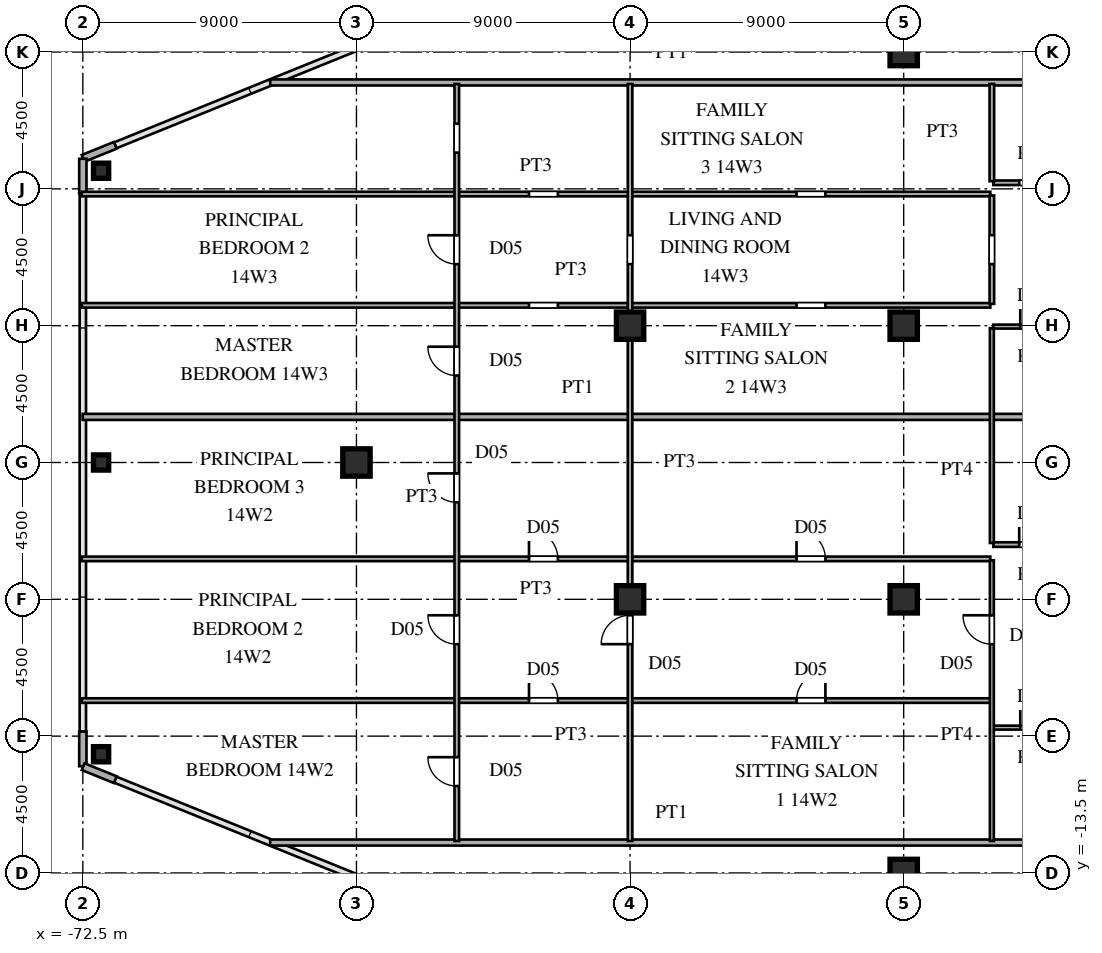
"""IFC4 building model, lengths in metres.
Left out: names, types, materials, properties, quantities, classifications, styles, units other than length and angle.
Written with IfcOpenShell. Run it as: python <this file> out.ifc"""

import sys

from ifc_helpers import new_model, si_unit, direction, frame, frame_2d, origin, origin_2d, place, context, subcontext, project, spatial, rectangle, hollow_rectangle, i_section, extrude, source, transform, mapped, element, fill, save


model = new_model("IFC4")
c1 = context("Model", 3, precision=1e-05, world=origin(), true_north=direction((0.0, 1.0)))
c2 = subcontext(c1, "Body", "Model", "MODEL_VIEW")
j1 = project(units=[si_unit("LENGTHUNIT", "METRE"), si_unit("PLANEANGLEUNIT", "RADIAN")], contexts=[c1])
p1 = place(None, origin())
s1 = spatial("IfcSite", under=j1, at=p1, CompositionType="ELEMENT")
p2 = place(p1, origin())
s2 = spatial("IfcBuilding", under=s1, at=p2, CompositionType="ELEMENT")
p3 = place(p2, frame((0.0, 0.0, 54.9)))
s3 = spatial("IfcBuildingStorey", under=s2, at=p3, CompositionType="ELEMENT", Elevation=54.9)
m1 = source(origin(), c2, "Body", "SweptSolid", [
    extrude(i_section(OverallWidth=0.9, OverallDepth=0.9, WebThickness=0.036, FlangeThickness=0.055, at=origin_2d()), origin(), (0.0, 0.0, 1.0), 3.6),
])
for number, where, z_axis, x_axis in (
    (1, (-45.5, -13.5, 0.0), (0.0, 0.0, 1.0), (1.0, 0.0, 0.0)),
    (2, (-45.5, -4.5, 0.0), (0.0, 0.0, 1.0), (1.0, 0.0, 0.0)),
    (3, (-45.5, 4.5, 0.0), (0.0, 0.0, 1.0), (1.0, 0.0, 0.0)),
    (4, (-45.5, 13.5, 0.0), (0.0, 0.0, 1.0), (1.0, 0.0, 0.0)),
    (5, (-54.5, -4.5, 0.0), (0.0, 0.0, 1.0), (1.0, 0.0, 0.0)),
    (6, (-54.5, 4.5, 0.0), (0.0, 0.0, 1.0), (1.0, 0.0, 0.0)),
    (7, (-63.5, 0.0, 0.0), (0.0, 0.0, 1.0), (1.0, 0.0, 0.0)),
):
    element("IfcColumn", number, at=place(p3, frame(where, z_axis=z_axis, x_axis=x_axis)), inside=s3, PredefinedType="COLUMN", context=c2, shape_type="MappedRepresentation", body=[
        mapped(m1, transform((0.0, 0.0, 0.0), scale=1.0)),
    ])
m2 = source(origin(), c2, "Body", "SweptSolid", [
    extrude(hollow_rectangle(XDim=0.5, YDim=0.5, WallThickness=0.02, at=origin_2d()), origin(), (0.0, 0.0, 1.0), 3.6),
])
for number, where, z_axis, x_axis in (
    (8, (-71.9, 9.596, 0.0), (0.0, 0.0, 1.0), (1.0, 0.0, 0.0)),
    (9, (-71.9, -9.596, 0.0), (0.0, 0.0, 1.0), (1.0, 0.0, 0.0)),
    (10, (-71.9, 0.0, 0.0), (0.0, 0.0, 1.0), (1.0, 0.0, 0.0)),
):
    element("IfcColumn", number, at=place(p3, frame(where, z_axis=z_axis, x_axis=x_axis)), inside=s3, PredefinedType="COLUMN", context=c2, shape_type="MappedRepresentation", body=[
        mapped(m2, transform((0.0, 0.0, 0.0), scale=1.0)),
    ])
for number, where, z_axis, x_axis in (
    (11, (-71.434, 10.431, 0.0), (0.0, 0.0, 1.0), (-0.927, -0.375, 0.0)),
    (12, (-72.5, 9.99, 0.0), (0.0, 0.0, 1.0), (0.0, -1.0, 0.0)),
    (13, (-72.5, -8.85, 0.0), (0.0, 0.0, 1.0), (0.0, -1.0, 0.0)),
    (14, (-72.491, -10.004, 0.0), (0.0, 0.0, 1.0), (0.927, -0.375, 0.0)),
):
    element("IfcWall", number, at=place(p3, frame(where, z_axis=z_axis, x_axis=x_axis)), inside=s3, PredefinedType="SOLIDWALL", context=c2, shape_type="SweptSolid", body=[
        extrude(rectangle(XDim=1.14, YDim=0.24, at=frame_2d((0.57, 0.0))), origin(), (0.0, 0.0, 1.0), 3.38),
    ])
p4 = place(p3, frame((-66.337, -12.5, 0.0), z_axis=(0.0, 0.0, 1.0), x_axis=(1.0, 0.0, 0.0)))
e15 = element("IfcWall", 15, at=p4, inside=s3, PredefinedType="PARTITIONING", context=c2, shape_type="SweptSolid", body=[
    extrude(rectangle(XDim=26.407, YDim=0.2, at=frame_2d((13.204, 0.0))), origin(), (0.0, 0.0, 1.0), 3.38),
])
p5 = place(p3, frame((-42.55, -8.72, 0.0), z_axis=(0.0, 0.0, 1.0), x_axis=(1.0, 0.0, 0.0)))
e16 = element("IfcWall", 16, at=p5, inside=s3, PredefinedType="PARTITIONING", context=c2, shape_type="SweptSolid", body=[
    extrude(rectangle(XDim=2.65, YDim=0.13, at=frame_2d((1.325, 0.0))), origin(), (0.0, 0.0, 1.0), 3.38),
])
p6 = place(p5, frame((0.885, 0.0, 0.0)))
e17 = element("IfcOpeningElement", 17, at=p6, cuts=e16, PredefinedType="OPENING", context=c2, shape_type="SweptSolid", body=[
    extrude(rectangle(XDim=0.88, YDim=2.1, at=frame_2d((0.44, 1.05))), frame((0.0, 0.075, 0.0), z_axis=(0.0, -1.0, 0.0), x_axis=(1.0, 0.0, 0.0)), (0.0, 0.0, 1.0), 0.15),
])
p7 = place(p3, frame((-72.535, -7.83, 0.0), z_axis=(0.0, 0.0, 1.0), x_axis=(1.0, 0.0, 0.0)))
e18 = element("IfcWall", 18, at=p7, inside=s3, PredefinedType="PARTITIONING", context=c2, shape_type="SweptSolid", body=[
    extrude(rectangle(XDim=29.885, YDim=0.15, at=frame_2d((14.942, 0.0))), origin(), (0.0, 0.0, 1.0), 3.38),
])
p8 = place(p7, frame((23.51, 0.0, 0.0)))
e19 = element("IfcOpeningElement", 19, at=p8, cuts=e18, PredefinedType="OPENING", context=c2, shape_type="SweptSolid", body=[
    extrude(rectangle(XDim=0.95, YDim=2.15, at=frame_2d((0.475, 1.075))), frame((0.0, 0.085, 0.0), z_axis=(0.0, -1.0, 0.0), x_axis=(1.0, 0.0, 0.0)), (0.0, 0.0, 1.0), 0.17),
])
p9 = place(p7, frame((14.71, 0.0, 0.0)))
e20 = element("IfcOpeningElement", 20, at=p9, cuts=e18, PredefinedType="OPENING", context=c2, shape_type="SweptSolid", body=[
    extrude(rectangle(XDim=0.95, YDim=2.15, at=frame_2d((0.475, 1.075))), frame((0.0, 0.085, 0.0), z_axis=(0.0, -1.0, 0.0), x_axis=(1.0, 0.0, 0.0)), (0.0, 0.0, 1.0), 0.17),
])
p10 = place(p3, frame((-72.535, -3.17, 0.0), z_axis=(0.0, 0.0, 1.0), x_axis=(1.0, 0.0, 0.0)))
e21 = element("IfcWall", 21, at=p10, inside=s3, PredefinedType="PARTITIONING", context=c2, shape_type="SweptSolid", body=[
    extrude(rectangle(XDim=29.885, YDim=0.15, at=frame_2d((14.942, 0.0))), origin(), (0.0, 0.0, 1.0), 3.38),
])
p11 = place(p10, frame((23.51, 0.0, 0.0)))
e22 = element("IfcOpeningElement", 22, at=p11, cuts=e21, PredefinedType="OPENING", context=c2, shape_type="SweptSolid", body=[
    extrude(rectangle(XDim=0.95, YDim=2.15, at=frame_2d((0.475, 1.075))), frame((0.0, 0.085, 0.0), z_axis=(0.0, -1.0, 0.0), x_axis=(1.0, 0.0, 0.0)), (0.0, 0.0, 1.0), 0.17),
])
p12 = place(p10, frame((14.71, 0.0, 0.0)))
e23 = element("IfcOpeningElement", 23, at=p12, cuts=e21, PredefinedType="OPENING", context=c2, shape_type="SweptSolid", body=[
    extrude(rectangle(XDim=0.95, YDim=2.15, at=frame_2d((0.475, 1.075))), frame((0.0, 0.085, 0.0), z_axis=(0.0, -1.0, 0.0), x_axis=(1.0, 0.0, 0.0)), (0.0, 0.0, 1.0), 0.17),
])
p13 = place(p3, frame((-42.55, -2.7, 0.0), z_axis=(0.0, 0.0, 1.0), x_axis=(1.0, 0.0, 0.0)))
e24 = element("IfcWall", 24, at=p13, inside=s3, PredefinedType="PARTITIONING", context=c2, shape_type="SweptSolid", body=[
    extrude(rectangle(XDim=2.65, YDim=0.15, at=frame_2d((1.325, 0.0))), origin(), (0.0, 0.0, 1.0), 3.38),
])
p14 = place(p13, frame((0.85, 0.0, 0.0)))
e25 = element("IfcOpeningElement", 25, at=p14, cuts=e24, PredefinedType="OPENING", context=c2, shape_type="SweptSolid", body=[
    extrude(rectangle(XDim=0.95, YDim=2.15, at=frame_2d((0.475, 1.075))), frame((0.0, 0.085, 0.0), z_axis=(0.0, -1.0, 0.0), x_axis=(1.0, 0.0, 0.0)), (0.0, 0.0, 1.0), 0.17),
])
p15 = place(p3, frame((-72.505, 1.5, 0.0), z_axis=(0.0, 0.0, 1.0), x_axis=(1.0, 0.0, 0.0)))
e26 = element("IfcWall", 26, at=p15, inside=s3, PredefinedType="PARTITIONING", context=c2, shape_type="SweptSolid", body=[
    extrude(rectangle(XDim=32.575, YDim=0.2, at=frame_2d((16.288, 0.0))), origin(), (0.0, 0.0, 1.0), 3.38),
])
p16 = place(p3, frame((-42.55, 4.47, 0.0), z_axis=(0.0, 0.0, 1.0), x_axis=(1.0, 0.0, 0.0)))
e27 = element("IfcWall", 27, at=p16, inside=s3, PredefinedType="PARTITIONING", context=c2, shape_type="SweptSolid", body=[
    extrude(rectangle(XDim=2.65, YDim=0.13, at=frame_2d((1.325, 0.0))), origin(), (0.0, 0.0, 1.0), 2.68),
])
p17 = place(p16, frame((0.885, 0.0, 0.0)))
e28 = element("IfcOpeningElement", 28, at=p17, cuts=e27, PredefinedType="OPENING", context=c2, shape_type="SweptSolid", body=[
    extrude(rectangle(XDim=0.88, YDim=2.1, at=frame_2d((0.44, 1.05))), frame((0.0, 0.075, 0.0), z_axis=(0.0, -1.0, 0.0), x_axis=(1.0, 0.0, 0.0)), (0.0, 0.0, 1.0), 0.15),
])
p18 = place(p3, frame((-72.535, 5.17, 0.0), z_axis=(0.0, 0.0, 1.0), x_axis=(1.0, 0.0, 0.0)))
e29 = element("IfcWall", 29, at=p18, inside=s3, PredefinedType="PARTITIONING", context=c2, shape_type="SweptSolid", body=[
    extrude(rectangle(XDim=29.885, YDim=0.15, at=frame_2d((14.942, 0.0))), origin(), (0.0, 0.0, 1.0), 3.38),
])
p19 = place(p18, frame((23.51, 0.0, 0.0)))
e30 = element("IfcOpeningElement", 30, at=p19, cuts=e29, PredefinedType="OPENING", context=c2, shape_type="SweptSolid", body=[
    extrude(rectangle(XDim=0.95, YDim=2.15, at=frame_2d((0.475, 1.075))), frame((0.0, 0.085, 0.0), z_axis=(0.0, -1.0, 0.0), x_axis=(1.0, 0.0, 0.0)), (0.0, 0.0, 1.0), 0.17),
])
p20 = place(p18, frame((14.71, 0.0, 0.0)))
e31 = element("IfcOpeningElement", 31, at=p20, cuts=e29, PredefinedType="OPENING", context=c2, shape_type="SweptSolid", body=[
    extrude(rectangle(XDim=0.95, YDim=2.15, at=frame_2d((0.475, 1.075))), frame((0.0, 0.085, 0.0), z_axis=(0.0, -1.0, 0.0), x_axis=(1.0, 0.0, 0.0)), (0.0, 0.0, 1.0), 0.17),
])
p21 = place(p3, frame((-72.535, 8.83, 0.0), z_axis=(0.0, 0.0, 1.0), x_axis=(1.0, 0.0, 0.0)))
e32 = element("IfcWall", 32, at=p21, inside=s3, PredefinedType="PARTITIONING", context=c2, shape_type="SweptSolid", body=[
    extrude(rectangle(XDim=29.885, YDim=0.15, at=frame_2d((14.942, 0.0))), origin(), (0.0, 0.0, 1.0), 3.38),
])
p22 = place(p21, frame((23.51, 0.0, 0.0)))
e33 = element("IfcOpeningElement", 33, at=p22, cuts=e32, PredefinedType="OPENING", context=c2, shape_type="SweptSolid", body=[
    extrude(rectangle(XDim=0.95, YDim=2.15, at=frame_2d((0.475, 1.075))), frame((0.0, 0.085, 0.0), z_axis=(0.0, -1.0, 0.0), x_axis=(1.0, 0.0, 0.0)), (0.0, 0.0, 1.0), 0.17),
])
p23 = place(p21, frame((14.71, 0.0, 0.0)))
e34 = element("IfcOpeningElement", 34, at=p23, cuts=e32, PredefinedType="OPENING", context=c2, shape_type="SweptSolid", body=[
    extrude(rectangle(XDim=0.95, YDim=2.15, at=frame_2d((0.475, 1.075))), frame((0.0, 0.085, 0.0), z_axis=(0.0, -1.0, 0.0), x_axis=(1.0, 0.0, 0.0)), (0.0, 0.0, 1.0), 0.17),
])
p24 = place(p3, frame((-42.55, 9.2, 0.0), z_axis=(0.0, 0.0, 1.0), x_axis=(1.0, 0.0, 0.0)))
e35 = element("IfcWall", 35, at=p24, inside=s3, PredefinedType="PARTITIONING", context=c2, shape_type="SweptSolid", body=[
    extrude(rectangle(XDim=2.65, YDim=0.15, at=frame_2d((1.325, 0.0))), origin(), (0.0, 0.0, 1.0), 3.38),
])
p25 = place(p24, frame((0.85, 0.0, 0.0)))
e36 = element("IfcOpeningElement", 36, at=p25, cuts=e35, PredefinedType="OPENING", context=c2, shape_type="SweptSolid", body=[
    extrude(rectangle(XDim=0.95, YDim=2.15, at=frame_2d((0.475, 1.075))), frame((0.0, 0.085, 0.0), z_axis=(0.0, -1.0, 0.0), x_axis=(1.0, 0.0, 0.0)), (0.0, 0.0, 1.0), 0.17),
])
p26 = place(p3, frame((-66.337, 12.5, 0.0), z_axis=(0.0, 0.0, 1.0), x_axis=(1.0, 0.0, 0.0)))
e37 = element("IfcWall", 37, at=p26, inside=s3, PredefinedType="PARTITIONING", context=c2, shape_type="SweptSolid", body=[
    extrude(rectangle(XDim=26.407, YDim=0.2, at=frame_2d((13.204, 0.0))), origin(), (0.0, 0.0, 1.0), 3.38),
])
p27 = place(p3, frame((-60.2, -12.45, 0.0), z_axis=(0.0, 0.0, 1.0), x_axis=(0.0, 1.0, 0.0)))
e38 = element("IfcWall", 38, at=p27, inside=s3, PredefinedType="PARTITIONING", context=c2, shape_type="SweptSolid", body=[
    extrude(rectangle(XDim=24.9, YDim=0.15, at=frame_2d((12.45, 0.0))), origin(), (0.0, 0.0, 1.0), 3.38),
])
p28 = place(p27, frame((1.808, 0.0, 0.0)))
e39 = element("IfcOpeningElement", 39, at=p28, cuts=e38, PredefinedType="OPENING", context=c2, shape_type="SweptSolid", body=[
    extrude(rectangle(XDim=0.95, YDim=2.15, at=frame_2d((0.475, 1.075))), frame((0.0, 0.085, 0.0), z_axis=(0.0, -1.0, 0.0), x_axis=(1.0, 0.0, 0.0)), (0.0, 0.0, 1.0), 0.17),
])
p29 = place(p27, frame((6.475, 0.0, 0.0)))
e40 = element("IfcOpeningElement", 40, at=p29, cuts=e38, PredefinedType="OPENING", context=c2, shape_type="SweptSolid", body=[
    extrude(rectangle(XDim=0.95, YDim=2.15, at=frame_2d((0.475, 1.075))), frame((0.0, 0.085, 0.0), z_axis=(0.0, -1.0, 0.0), x_axis=(1.0, 0.0, 0.0)), (0.0, 0.0, 1.0), 0.17),
])
p30 = place(p27, frame((11.142, 0.0, 0.0)))
e41 = element("IfcOpeningElement", 41, at=p30, cuts=e38, PredefinedType="OPENING", context=c2, shape_type="SweptSolid", body=[
    extrude(rectangle(XDim=0.95, YDim=2.15, at=frame_2d((0.475, 1.075))), frame((0.0, 0.085, 0.0), z_axis=(0.0, -1.0, 0.0), x_axis=(1.0, 0.0, 0.0)), (0.0, 0.0, 1.0), 0.17),
])
p31 = place(p27, frame((15.308, 0.0, 0.0)))
e42 = element("IfcOpeningElement", 42, at=p31, cuts=e38, PredefinedType="OPENING", context=c2, shape_type="SweptSolid", body=[
    extrude(rectangle(XDim=0.95, YDim=2.15, at=frame_2d((0.475, 1.075))), frame((0.0, 0.085, 0.0), z_axis=(0.0, -1.0, 0.0), x_axis=(1.0, 0.0, 0.0)), (0.0, 0.0, 1.0), 0.17),
])
p32 = place(p27, frame((18.975, 0.0, 0.0)))
e43 = element("IfcOpeningElement", 43, at=p32, cuts=e38, PredefinedType="OPENING", context=c2, shape_type="SweptSolid", body=[
    extrude(rectangle(XDim=0.95, YDim=2.15, at=frame_2d((0.475, 1.075))), frame((0.0, 0.085, 0.0), z_axis=(0.0, -1.0, 0.0), x_axis=(1.0, 0.0, 0.0)), (0.0, 0.0, 1.0), 0.17),
])
p33 = place(p27, frame((22.642, 0.0, 0.0)))
e44 = element("IfcOpeningElement", 44, at=p33, cuts=e38, PredefinedType="OPENING", context=c2, shape_type="SweptSolid", body=[
    extrude(rectangle(XDim=0.95, YDim=2.15, at=frame_2d((0.475, 1.075))), frame((0.0, 0.085, 0.0), z_axis=(0.0, -1.0, 0.0), x_axis=(1.0, 0.0, 0.0)), (0.0, 0.0, 1.0), 0.17),
])
p34 = place(p3, frame((-54.5, -12.45, 0.0), z_axis=(0.0, 0.0, 1.0), x_axis=(0.0, 1.0, 0.0)))
e45 = element("IfcWall", 45, at=p34, inside=s3, PredefinedType="PARTITIONING", context=c2, shape_type="SweptSolid", body=[
    extrude(rectangle(XDim=24.9, YDim=0.15, at=frame_2d((12.45, 0.0))), origin(), (0.0, 0.0, 1.0), 2.68),
])
p35 = place(p34, frame((6.475, 0.0, 0.0)))
e46 = element("IfcOpeningElement", 46, at=p35, cuts=e45, PredefinedType="OPENING", context=c2, shape_type="SweptSolid", body=[
    extrude(rectangle(XDim=0.95, YDim=2.15, at=frame_2d((0.475, 1.075))), frame((0.0, 0.085, 0.0), z_axis=(0.0, -1.0, 0.0), x_axis=(1.0, 0.0, 0.0)), (0.0, 0.0, 1.0), 0.17),
])
p36 = place(p34, frame((18.975, 0.0, 0.0)))
e47 = element("IfcOpeningElement", 47, at=p36, cuts=e45, PredefinedType="OPENING", context=c2, shape_type="SweptSolid", body=[
    extrude(rectangle(XDim=0.95, YDim=2.15, at=frame_2d((0.475, 1.075))), frame((0.0, 0.085, 0.0), z_axis=(0.0, -1.0, 0.0), x_axis=(1.0, 0.0, 0.0)), (0.0, 0.0, 1.0), 0.17),
])
p37 = place(p3, frame((-42.6, -12.45, 0.0), z_axis=(0.0, 0.0, 1.0), x_axis=(0.0, 1.0, 0.0)))
e48 = element("IfcWall", 48, at=p37, inside=s3, PredefinedType="PARTITIONING", context=c2, shape_type="SweptSolid", body=[
    extrude(rectangle(XDim=9.233, YDim=0.13, at=frame_2d((4.616, 0.0))), origin(), (0.0, 0.0, 1.0), 3.38),
])
p38 = place(p37, frame((6.475, 0.0, 0.0)))
e49 = element("IfcOpeningElement", 49, at=p38, cuts=e48, PredefinedType="OPENING", context=c2, shape_type="SweptSolid", body=[
    extrude(rectangle(XDim=0.95, YDim=2.15, at=frame_2d((0.475, 1.075))), frame((0.0, 0.075, 0.0), z_axis=(0.0, -1.0, 0.0), x_axis=(1.0, 0.0, 0.0)), (0.0, 0.0, 1.0), 0.15),
])
p39 = place(p3, frame((-42.6, -2.648, 0.0), z_axis=(0.0, 0.0, 1.0), x_axis=(0.0, 1.0, 0.0)))
e50 = element("IfcWall", 50, at=p39, inside=s3, PredefinedType="PARTITIONING", context=c2, shape_type="SweptSolid", body=[
    extrude(rectangle(XDim=7.066, YDim=0.13, at=frame_2d((3.533, 0.0))), origin(), (0.0, 0.0, 1.0), 3.38),
])
p40 = place(p3, frame((-42.6, 5.217, 0.0), z_axis=(0.0, 0.0, 1.0), x_axis=(0.0, 1.0, 0.0)))
e51 = element("IfcWall", 51, at=p40, inside=s3, PredefinedType="PARTITIONING", context=c2, shape_type="SweptSolid", body=[
    extrude(rectangle(XDim=3.566, YDim=0.15, at=frame_2d((1.783, 0.0))), origin(), (0.0, 0.0, 1.0), 3.38),
])
p41 = place(p40, frame((1.308, 0.0, 0.0)))
e52 = element("IfcOpeningElement", 52, at=p41, cuts=e51, PredefinedType="OPENING", context=c2, shape_type="SweptSolid", body=[
    extrude(rectangle(XDim=0.95, YDim=2.15, at=frame_2d((0.475, 1.075))), frame((0.0, 0.085, 0.0), z_axis=(0.0, -1.0, 0.0), x_axis=(1.0, 0.0, 0.0)), (0.0, 0.0, 1.0), 0.17),
])
p42 = place(p3, frame((-42.6, 9.252, 0.0), z_axis=(0.0, 0.0, 1.0), x_axis=(0.0, 1.0, 0.0)))
e53 = element("IfcWall", 53, at=p42, inside=s3, PredefinedType="PARTITIONING", context=c2, shape_type="SweptSolid", body=[
    extrude(rectangle(XDim=3.198, YDim=0.15, at=frame_2d((1.599, 0.0))), origin(), (0.0, 0.0, 1.0), 3.38),
])
m3 = source(origin(), c2, "Body", "SweptSolid", [
    extrude(rectangle(XDim=0.88, YDim=2.1, at=frame_2d((0.44, 1.05))), frame((0.0, 0.025, 0.0), z_axis=(0.0, -1.0, 0.0), x_axis=(1.0, 0.0, 0.0)), (0.0, 0.0, 1.0), 0.05),
])
p43 = place(p6, origin())
e54 = element("IfcDoor", 54, at=p43, inside=s3, OperationType="SINGLE_SWING_LEFT", PredefinedType="DOOR", context=c2, shape_type="MappedRepresentation", body=[
    mapped(m3, transform((0.0, 0.0, 0.0), scale=1.0)),
])
fill(e17, e54)
m4 = source(origin(), c2, "Body", "SweptSolid", [
    extrude(rectangle(XDim=0.95, YDim=2.15, at=frame_2d((0.475, 1.075))), frame((0.0, 0.025, 0.0), z_axis=(0.0, -1.0, 0.0), x_axis=(1.0, 0.0, 0.0)), (0.0, 0.0, 1.0), 0.05),
])
p44 = place(p8, origin())
e55 = element("IfcDoor", 55, at=p44, inside=s3, OperationType="SINGLE_SWING_RIGHT", PredefinedType="DOOR", context=c2, shape_type="MappedRepresentation", body=[
    mapped(m4, transform((0.0, 0.0, 0.0), scale=1.0)),
])
fill(e19, e55)
p45 = place(p9, origin())
e56 = element("IfcDoor", 56, at=p45, inside=s3, OperationType="SINGLE_SWING_LEFT", PredefinedType="DOOR", context=c2, shape_type="MappedRepresentation", body=[
    mapped(m4, transform((0.0, 0.0, 0.0), scale=1.0)),
])
fill(e20, e56)
p46 = place(p11, origin())
e57 = element("IfcDoor", 57, at=p46, inside=s3, OperationType="SINGLE_SWING_LEFT", PredefinedType="DOOR", context=c2, shape_type="MappedRepresentation", body=[
    mapped(m4, transform((0.0, 0.0, 0.0), scale=1.0)),
])
fill(e22, e57)
p47 = place(p12, origin())
e58 = element("IfcDoor", 58, at=p47, inside=s3, OperationType="SINGLE_SWING_LEFT", PredefinedType="DOOR", context=c2, shape_type="MappedRepresentation", body=[
    mapped(m4, transform((0.0, 0.0, 0.0), scale=1.0)),
])
fill(e23, e58)
p48 = place(p14, origin())
e59 = element("IfcDoor", 59, at=p48, inside=s3, OperationType="SINGLE_SWING_LEFT", PredefinedType="DOOR", context=c2, shape_type="MappedRepresentation", body=[
    mapped(m4, transform((0.0, 0.0, 0.0), scale=1.0)),
])
fill(e25, e59)
p49 = place(p17, origin())
e60 = element("IfcDoor", 60, at=p49, inside=s3, OperationType="SINGLE_SWING_LEFT", PredefinedType="DOOR", context=c2, shape_type="MappedRepresentation", body=[
    mapped(m3, transform((0.0, 0.0, 0.0), scale=1.0)),
])
fill(e28, e60)
p50 = place(p28, origin())
e61 = element("IfcDoor", 61, at=p50, inside=s3, OperationType="SINGLE_SWING_RIGHT", PredefinedType="DOOR", context=c2, shape_type="MappedRepresentation", body=[
    mapped(m4, transform((0.0, 0.0, 0.0), scale=1.0)),
])
fill(e39, e61)
p51 = place(p29, origin())
e62 = element("IfcDoor", 62, at=p51, inside=s3, OperationType="SINGLE_SWING_RIGHT", PredefinedType="DOOR", context=c2, shape_type="MappedRepresentation", body=[
    mapped(m4, transform((0.0, 0.0, 0.0), scale=1.0)),
])
fill(e40, e62)
p52 = place(p30, origin())
e63 = element("IfcDoor", 63, at=p52, inside=s3, OperationType="SINGLE_SWING_RIGHT", PredefinedType="DOOR", context=c2, shape_type="MappedRepresentation", body=[
    mapped(m4, transform((0.0, 0.0, 0.0), scale=1.0)),
])
fill(e41, e63)
p53 = place(p31, origin())
e64 = element("IfcDoor", 64, at=p53, inside=s3, OperationType="SINGLE_SWING_RIGHT", PredefinedType="DOOR", context=c2, shape_type="MappedRepresentation", body=[
    mapped(m4, transform((0.0, 0.0, 0.0), scale=1.0)),
])
fill(e42, e64)
p54 = place(p32, origin())
e65 = element("IfcDoor", 65, at=p54, inside=s3, OperationType="SINGLE_SWING_RIGHT", PredefinedType="DOOR", context=c2, shape_type="MappedRepresentation", body=[
    mapped(m4, transform((0.0, 0.0, 0.0), scale=1.0)),
])
fill(e43, e65)
p55 = place(p35, origin())
e66 = element("IfcDoor", 66, at=p55, inside=s3, OperationType="SINGLE_SWING_LEFT", PredefinedType="DOOR", context=c2, shape_type="MappedRepresentation", body=[
    mapped(m4, transform((0.0, 0.0, 0.0), scale=1.0)),
])
fill(e46, e66)
p56 = place(p38, origin())
e67 = element("IfcDoor", 67, at=p56, inside=s3, OperationType="SINGLE_SWING_RIGHT", PredefinedType="DOOR", context=c2, shape_type="MappedRepresentation", body=[
    mapped(m4, transform((0.0, 0.0, 0.0), scale=1.0)),
])
fill(e49, e67)
save(model, sys.argv[1])
